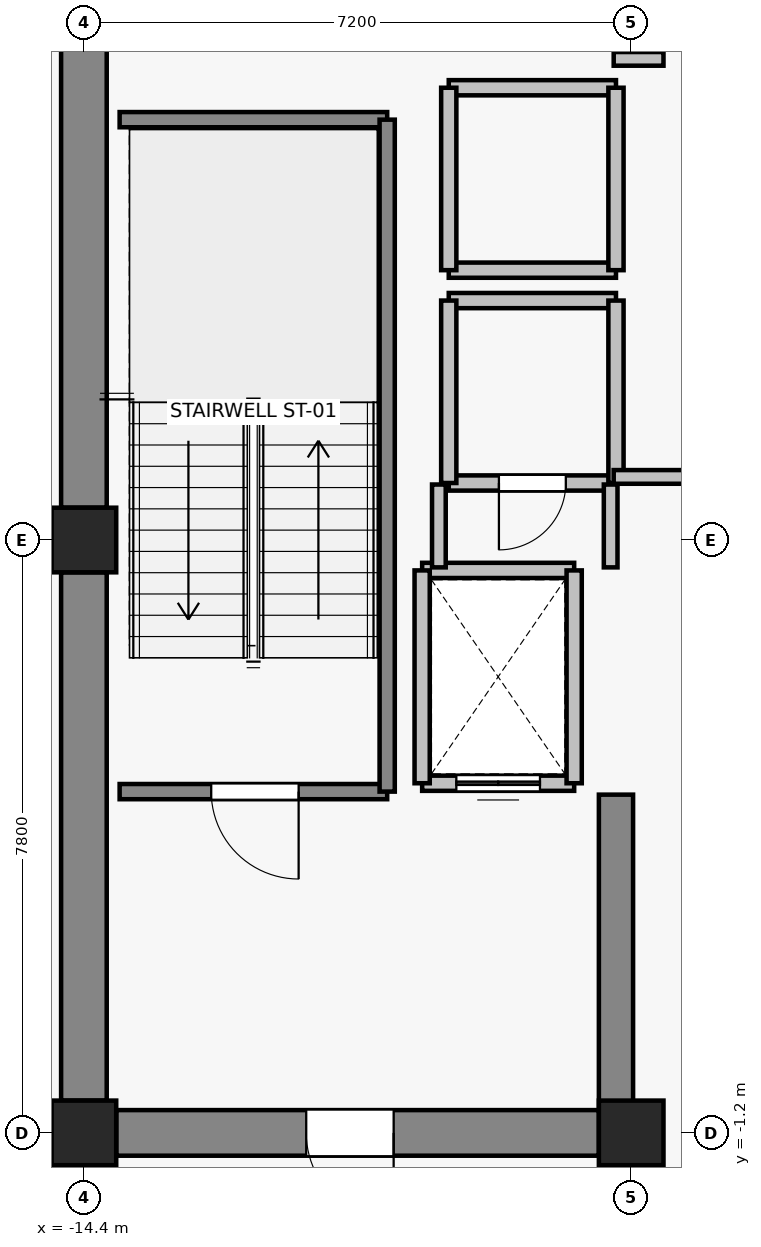
"""IFC4 building model, lengths in metres.
Left out: names, types, materials, properties, quantities, classifications, styles, units other than length and angle.
Written with IfcOpenShell. Run it as: python <this file> out.ifc"""

import sys

from ifc_helpers import new_model, si_unit, direction, frame, frame_2d, origin, origin_2d, place, context, subcontext, project, spatial, rectangle, extrude, source, transform, mapped, element, fill, save


model = new_model("IFC4")
c1 = context("Model", 3, precision=1e-05, world=origin(), true_north=direction((0.0, 1.0)))
c2 = subcontext(c1, "Body", "Model", "MODEL_VIEW")
j1 = project(units=[si_unit("LENGTHUNIT", "METRE"), si_unit("PLANEANGLEUNIT", "RADIAN")], contexts=[c1])
p1 = place(None, origin())
s1 = spatial("IfcSite", under=j1, at=p1, CompositionType="ELEMENT")
p2 = place(p1, origin())
s2 = spatial("IfcBuilding", under=s1, at=p2, CompositionType="ELEMENT")
p3 = place(p2, frame((0.0, 0.0, 271.6)))
s3 = spatial("IfcBuildingStorey", under=s2, at=p3, CompositionType="ELEMENT", Elevation=271.6)
for number, where, z_axis, x_axis in (
    (1, (-14.4, -1.2, 0.0), (0.0, 0.0, 1.0), (1.0, 0.0, 0.0)),
    (2, (-7.2, -1.2, 0.0), (0.0, 0.0, 1.0), (1.0, 0.0, 0.0)),
    (3, (-14.4, 6.6, 0.0), (0.0, 0.0, 1.0), (1.0, 0.0, 0.0)),
):
    element("IfcColumn", number, at=place(p3, frame(where, z_axis=z_axis, x_axis=x_axis)), inside=s3, PredefinedType="COLUMN", context=c2, shape_type="SweptSolid", body=[
        extrude(rectangle(XDim=0.85, YDim=0.85, at=origin_2d()), origin(), (0.0, 0.0, 1.0), 4.6),
    ])
p4 = place(p3, frame((-14.4, -0.775, 0.0), z_axis=(0.0, 0.0, 1.0), x_axis=(0.0, 1.0, 0.0)))
e4 = element("IfcWall", 4, at=p4, inside=s3, PredefinedType="SHEAR", context=c2, shape_type="SweptSolid", body=[
    extrude(rectangle(XDim=6.95, YDim=0.6, at=frame_2d((3.475, 0.0))), origin(), (0.0, 0.0, 1.0), 4.38),
])
p5 = place(p3, frame((-14.4, 7.025, 0.0), z_axis=(0.0, 0.0, 1.0), x_axis=(0.0, 1.0, 0.0)))
e5 = element("IfcWall", 5, at=p5, inside=s3, PredefinedType="SHEAR", context=c2, shape_type="SweptSolid", body=[
    extrude(rectangle(XDim=6.05, YDim=0.6, at=frame_2d((3.025, 0.0))), origin(), (0.0, 0.0, 1.0), 4.38),
])
p6 = place(p3, frame((-7.625, -1.2, 0.0), z_axis=(0.0, 0.0, 1.0), x_axis=(-1.0, 0.0, 0.0)))
e6 = element("IfcWall", 6, at=p6, inside=s3, PredefinedType="SHEAR", context=c2, shape_type="SweptSolid", body=[
    extrude(rectangle(XDim=6.35, YDim=0.6, at=frame_2d((3.175, 0.0))), origin(), (0.0, 0.0, 1.0), 4.38),
])
p7 = place(p6, frame((2.7, 0.0, 0.0)))
e7 = element("IfcOpeningElement", 7, at=p7, cuts=e6, PredefinedType="OPENING", context=c2, shape_type="SweptSolid", body=[
    extrude(rectangle(XDim=1.15, YDim=2.15, at=frame_2d((0.575, 1.075))), frame((0.0, 0.31, 0.0), z_axis=(0.0, -1.0, 0.0), x_axis=(1.0, 0.0, 0.0)), (0.0, 0.0, 1.0), 0.62),
])
p8 = place(p3, frame((-7.4, -0.9, 0.0), z_axis=(0.0, 0.0, 1.0), x_axis=(0.0, 1.0, 0.0)))
e8 = element("IfcWall", 8, at=p8, inside=s3, PredefinedType="SHEAR", context=c2, shape_type="SweptSolid", body=[
    extrude(rectangle(XDim=4.15, YDim=0.45, at=frame_2d((2.075, 0.0))), origin(), (0.0, 0.0, 1.0), 4.38),
])
p9 = place(p3, frame((-7.95, 3.4, 0.0), z_axis=(0.0, 0.0, 1.0), x_axis=(-1.0, 0.0, 0.0)))
e9 = element("IfcWall", 9, at=p9, inside=s3, PredefinedType="SOLIDWALL", context=c2, shape_type="SweptSolid", body=[
    extrude(rectangle(XDim=2.0, YDim=0.2, at=frame_2d((1.0, 0.0))), origin(), (0.0, 0.0, 1.0), 4.38),
])
p10 = place(p9, frame((0.45, 0.0, 0.0)))
e10 = element("IfcOpeningElement", 10, at=p10, cuts=e9, PredefinedType="OPENING", context=c2, shape_type="SweptSolid", body=[
    extrude(rectangle(XDim=1.1, YDim=2.2, at=frame_2d((0.55, 1.1))), frame((0.0, 0.11, 0.0), z_axis=(0.0, -1.0, 0.0), x_axis=(1.0, 0.0, 0.0)), (0.0, 0.0, 1.0), 0.22),
])
p11 = place(p3, frame((-9.95, 6.2, 0.0), z_axis=(0.0, 0.0, 1.0), x_axis=(1.0, 0.0, 0.0)))
e11 = element("IfcWall", 11, at=p11, inside=s3, PredefinedType="SOLIDWALL", context=c2, shape_type="SweptSolid", body=[
    extrude(rectangle(XDim=2.0, YDim=0.2, at=frame_2d((1.0, 0.0))), origin(), (0.0, 0.0, 1.0), 4.38),
])
for number, where, z_axis, x_axis in (
    (12, (-9.95, 3.4, 0.0), (0.0, 0.0, 1.0), (0.0, 1.0, 0.0)),
    (13, (-7.95, 6.2, 0.0), (0.0, 0.0, 1.0), (0.0, -1.0, 0.0)),
):
    element("IfcWall", number, at=place(p3, frame(where, z_axis=z_axis, x_axis=x_axis)), inside=s3, PredefinedType="SOLIDWALL", context=c2, shape_type="SweptSolid", body=[
        extrude(rectangle(XDim=2.8, YDim=0.2, at=frame_2d((1.4, 0.0))), origin(), (0.0, 0.0, 1.0), 4.38),
    ])
p12 = place(p3, frame((-7.4, 7.35, 0.0), z_axis=(0.0, 0.0, 1.0), x_axis=(-1.0, 0.0, 0.0)))
e14 = element("IfcWall", 14, at=p12, inside=s3, PredefinedType="SOLIDWALL", context=c2, shape_type="SweptSolid", body=[
    extrude(rectangle(XDim=2.2, YDim=0.2, at=frame_2d((1.1, 0.0))), origin(), (0.0, 0.0, 1.0), 3.77),
])
p13 = place(p12, frame((0.66, 0.0, 0.0)))
e15 = element("IfcOpeningElement", 15, at=p13, cuts=e14, PredefinedType="OPENING", context=c2, shape_type="SweptSolid", body=[
    extrude(rectangle(XDim=0.88, YDim=2.1, at=frame_2d((0.44, 1.05))), frame((0.0, 0.11, 0.0), z_axis=(0.0, -1.0, 0.0), x_axis=(1.0, 0.0, 0.0)), (0.0, 0.0, 1.0), 0.22),
])
p14 = place(p3, frame((-9.6, 9.75, 0.0), z_axis=(0.0, 0.0, 1.0), x_axis=(1.0, 0.0, 0.0)))
e16 = element("IfcWall", 16, at=p14, inside=s3, PredefinedType="SOLIDWALL", context=c2, shape_type="SweptSolid", body=[
    extrude(rectangle(XDim=2.2, YDim=0.2, at=frame_2d((1.1, 0.0))), origin(), (0.0, 0.0, 1.0), 3.77),
])
p15 = place(p3, frame((-9.6, 7.35, 0.0), z_axis=(0.0, 0.0, 1.0), x_axis=(0.0, 1.0, 0.0)))
e17 = element("IfcWall", 17, at=p15, inside=s3, PredefinedType="SOLIDWALL", context=c2, shape_type="SweptSolid", body=[
    extrude(rectangle(XDim=2.4, YDim=0.2, at=frame_2d((1.2, 0.0))), origin(), (0.0, 0.0, 1.0), 4.38),
])
p16 = place(p3, frame((-7.4, 9.75, 0.0), z_axis=(0.0, 0.0, 1.0), x_axis=(0.0, -1.0, 0.0)))
e18 = element("IfcWall", 18, at=p16, inside=s3, PredefinedType="SOLIDWALL", context=c2, shape_type="SweptSolid", body=[
    extrude(rectangle(XDim=2.4, YDim=0.2, at=frame_2d((1.2, 0.0))), origin(), (0.0, 0.0, 1.0), 3.77),
])
for number, where, z_axis, x_axis in (
    (19, (-7.4, 10.15, 0.0), (0.0, 0.0, 1.0), (-1.0, 0.0, 0.0)),
    (20, (-9.6, 12.55, 0.0), (0.0, 0.0, 1.0), (1.0, 0.0, 0.0)),
):
    element("IfcWall", number, at=place(p3, frame(where, z_axis=z_axis, x_axis=x_axis)), inside=s3, PredefinedType="SOLIDWALL", context=c2, shape_type="SweptSolid", body=[
        extrude(rectangle(XDim=2.2, YDim=0.2, at=frame_2d((1.1, 0.0))), origin(), (0.0, 0.0, 1.0), 3.77),
    ])
p17 = place(p3, frame((-9.6, 10.15, 0.0), z_axis=(0.0, 0.0, 1.0), x_axis=(0.0, 1.0, 0.0)))
e21 = element("IfcWall", 21, at=p17, inside=s3, PredefinedType="SOLIDWALL", context=c2, shape_type="SweptSolid", body=[
    extrude(rectangle(XDim=2.4, YDim=0.2, at=frame_2d((1.2, 0.0))), origin(), (0.0, 0.0, 1.0), 4.38),
])
p18 = place(p3, frame((-7.4, 12.55, 0.0), z_axis=(0.0, 0.0, 1.0), x_axis=(0.0, -1.0, 0.0)))
e22 = element("IfcWall", 22, at=p18, inside=s3, PredefinedType="SOLIDWALL", context=c2, shape_type="SweptSolid", body=[
    extrude(rectangle(XDim=2.4, YDim=0.2, at=frame_2d((1.2, 0.0))), origin(), (0.0, 0.0, 1.0), 3.77),
])
p19 = place(p3, frame((-10.41, 3.29, 0.0), z_axis=(0.0, 0.0, 1.0), x_axis=(-1.0, 0.0, 0.0)))
e23 = element("IfcWall", 23, at=p19, inside=s3, PredefinedType="SOLIDWALL", context=c2, shape_type="SweptSolid", body=[
    extrude(rectangle(XDim=3.52, YDim=0.2, at=frame_2d((1.76, 0.0))), origin(), (0.0, 0.0, 1.0), 4.38),
])
p20 = place(p19, frame((1.165, 0.0, 0.0)))
e24 = element("IfcOpeningElement", 24, at=p20, cuts=e23, PredefinedType="OPENING", context=c2, shape_type="SweptSolid", body=[
    extrude(rectangle(XDim=1.15, YDim=2.15, at=frame_2d((0.575, 1.075))), frame((0.0, 0.11, 0.0), z_axis=(0.0, -1.0, 0.0), x_axis=(1.0, 0.0, 0.0)), (0.0, 0.0, 1.0), 0.22),
])
p21 = place(p3, frame((-13.93, 12.13, 0.0), z_axis=(0.0, 0.0, 1.0), x_axis=(1.0, 0.0, 0.0)))
e25 = element("IfcWall", 25, at=p21, inside=s3, PredefinedType="SOLIDWALL", context=c2, shape_type="SweptSolid", body=[
    extrude(rectangle(XDim=3.52, YDim=0.2, at=frame_2d((1.76, 0.0))), origin(), (0.0, 0.0, 1.0), 4.38),
])
p22 = place(p3, frame((-10.41, 12.13, 0.0), z_axis=(0.0, 0.0, 1.0), x_axis=(0.0, -1.0, 0.0)))
e26 = element("IfcWall", 26, at=p22, inside=s3, PredefinedType="SOLIDWALL", context=c2, shape_type="SweptSolid", body=[
    extrude(rectangle(XDim=8.84, YDim=0.2, at=frame_2d((4.42, 0.0))), origin(), (0.0, 0.0, 1.0), 4.38),
])
p23 = place(p3, frame((7.43, 7.43, 0.0), z_axis=(0.0, 0.0, 1.0), x_axis=(-1.0, 0.0, 0.0)))
e27 = element("IfcWall", 27, at=p23, inside=s3, PredefinedType="PARTITIONING", context=c2, shape_type="SweptSolid", body=[
    extrude(rectangle(XDim=14.86, YDim=0.18, at=frame_2d((7.43, 0.0))), origin(), (0.0, 0.0, 1.0), 3.77),
])
p24 = place(p23, frame((6.805, 0.0, 0.0)))
e28 = element("IfcOpeningElement", 28, at=p24, cuts=e27, PredefinedType="OPENING", context=c2, shape_type="SweptSolid", body=[
    extrude(rectangle(XDim=1.25, YDim=2.15, at=frame_2d((0.625, 1.075))), frame((0.0, 0.1, 0.0), z_axis=(0.0, -1.0, 0.0), x_axis=(1.0, 0.0, 0.0)), (0.0, 0.0, 1.0), 0.2),
])
p25 = place(p3, frame((-7.43, 12.93, 0.0), z_axis=(0.0, 0.0, 1.0), x_axis=(1.0, 0.0, 0.0)))
e29 = element("IfcWall", 29, at=p25, inside=s3, PredefinedType="PARTITIONING", context=c2, shape_type="SweptSolid", body=[
    extrude(rectangle(XDim=0.655, YDim=0.18, at=frame_2d((0.328, 0.0))), origin(), (0.0, 0.0, 1.0), 3.77),
])
p26 = place(p3, frame((-9.73, 6.24, 0.0), z_axis=(0.0, 0.0, 1.0), x_axis=(0.0, 1.0, 0.0)))
e30 = element("IfcWall", 30, at=p26, inside=s3, PredefinedType="PARTITIONING", context=c2, shape_type="SweptSolid", body=[
    extrude(rectangle(XDim=1.09, YDim=0.18, at=frame_2d((0.545, 0.0))), origin(), (0.0, 0.0, 1.0), 4.38),
])
p27 = place(p3, frame((-7.47, 7.33, 0.0), z_axis=(0.0, 0.0, 1.0), x_axis=(0.0, -1.0, 0.0)))
e31 = element("IfcWall", 31, at=p27, inside=s3, PredefinedType="PARTITIONING", context=c2, shape_type="SweptSolid", body=[
    extrude(rectangle(XDim=1.09, YDim=0.18, at=frame_2d((0.545, 0.0))), origin(), (0.0, 0.0, 1.0), 3.77),
])
m1 = source(origin(), c2, "Body", "SweptSolid", [
    extrude(rectangle(XDim=1.1, YDim=2.2, at=frame_2d((0.55, 1.1))), frame((0.0, 0.025, 0.0), z_axis=(0.0, -1.0, 0.0), x_axis=(1.0, 0.0, 0.0)), (0.0, 0.0, 1.0), 0.05),
])
p28 = place(p10, origin())
e32 = element("IfcDoor", 32, at=p28, inside=s3, OperationType="DOUBLE_DOOR_SLIDING", PredefinedType="DOOR", context=c2, shape_type="MappedRepresentation", body=[
    mapped(m1, transform((0.0, 0.0, 0.0), x_axis=(1.0, 0.0, 0.0), y_axis=(0.0, 1.0, 0.0), z_axis=(0.0, 0.0, 1.0), scale=1.0)),
])
fill(e10, e32)
m2 = source(origin(), c2, "Body", "SweptSolid", [
    extrude(rectangle(XDim=1.15, YDim=2.15, at=frame_2d((0.575, 1.075))), frame((0.0, 0.025, 0.0), z_axis=(0.0, -1.0, 0.0), x_axis=(1.0, 0.0, 0.0)), (0.0, 0.0, 1.0), 0.05),
])
p29 = place(p20, origin())
e33 = element("IfcDoor", 33, at=p29, inside=s3, OperationType="SINGLE_SWING_LEFT", PredefinedType="DOOR", context=c2, shape_type="MappedRepresentation", body=[
    mapped(m2, transform((0.0, 0.0, 0.0), x_axis=(1.0, 0.0, 0.0), y_axis=(0.0, 1.0, 0.0), z_axis=(0.0, 0.0, 1.0), scale=1.0)),
])
fill(e24, e33)
p30 = place(p7, origin())
e34 = element("IfcDoor", 34, at=p30, inside=s3, OperationType="SINGLE_SWING_LEFT", PredefinedType="DOOR", context=c2, shape_type="MappedRepresentation", body=[
    mapped(m2, transform((0.0, 0.0, 0.0), x_axis=(1.0, 0.0, 0.0), y_axis=(0.0, 1.0, 0.0), z_axis=(0.0, 0.0, 1.0), scale=1.0)),
])
fill(e7, e34)
m3 = source(origin(), c2, "Body", "SweptSolid", [
    extrude(rectangle(XDim=0.88, YDim=2.1, at=frame_2d((0.44, 1.05))), frame((0.0, 0.025, 0.0), z_axis=(0.0, -1.0, 0.0), x_axis=(1.0, 0.0, 0.0)), (0.0, 0.0, 1.0), 0.05),
])
p31 = place(p13, origin())
e35 = element("IfcDoor", 35, at=p31, inside=s3, OperationType="SINGLE_SWING_RIGHT", PredefinedType="DOOR", context=c2, shape_type="MappedRepresentation", body=[
    mapped(m3, transform((0.0, 0.0, 0.0), x_axis=(1.0, 0.0, 0.0), y_axis=(0.0, 1.0, 0.0), z_axis=(0.0, 0.0, 1.0), scale=1.0)),
])
fill(e15, e35)
save(model, sys.argv[1])
